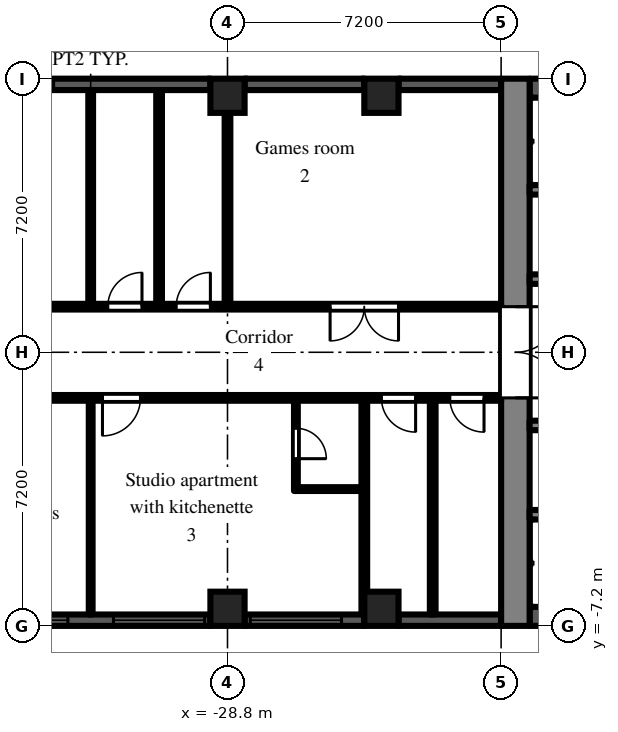
"""IFC4 building model, lengths in metres.
Left out: names, types, materials, properties, quantities, classifications, styles, units other than length and angle.
Written with IfcOpenShell. Run it as: python <this file> out.ifc"""

import sys

from ifc_helpers import new_model, si_unit, direction, frame, frame_2d, origin, origin_2d, place, context, subcontext, project, spatial, rectangle, extrude, element, fill, save


model = new_model("IFC4")
c1 = context("Model", 3, precision=1e-05, world=origin(), true_north=direction((0.0, 1.0)))
c2 = subcontext(c1, "Body", "Model", "MODEL_VIEW")
j1 = project(units=[si_unit("LENGTHUNIT", "METRE"), si_unit("PLANEANGLEUNIT", "RADIAN")], contexts=[c1])
p1 = place(None, origin())
s1 = spatial("IfcSite", under=j1, at=p1, CompositionType="ELEMENT")
p2 = place(p1, origin())
s2 = spatial("IfcBuilding", under=s1, at=p2, CompositionType="ELEMENT")
p3 = place(p2, frame((0.0, 0.0, 75.9)))
s3 = spatial("IfcBuildingStorey", under=s2, at=p3, CompositionType="ELEMENT", Elevation=75.9)
for number, where, z_axis, x_axis in (
    (1, (-28.8, -6.75, 0.0), (0.0, 0.0, 1.0), (1.0, 0.0, 0.0)),
    (2, (-28.8, 6.75, 0.0), (0.0, 0.0, 1.0), (1.0, 0.0, 0.0)),
    (3, (-24.75, -6.75, 0.0), (0.0, 0.0, 1.0), (1.0, 0.0, 0.0)),
    (4, (-24.75, 6.75, 0.0), (0.0, 0.0, 1.0), (1.0, 0.0, 0.0)),
):
    element("IfcColumn", number, at=place(p3, frame(where, z_axis=z_axis, x_axis=x_axis)), inside=s3, PredefinedType="COLUMN", context=c2, shape_type="SweptSolid", body=[
        extrude(rectangle(XDim=0.9, YDim=0.9, at=origin_2d()), origin(), (0.0, 0.0, 1.0), 3.0),
    ])
p4 = place(p3, frame((-21.6, 7.05, 0.0), z_axis=(0.0, 0.0, 1.0), x_axis=(-1.0, 0.0, 0.0)))
e5 = element("IfcWall", 5, at=p4, inside=s3, PredefinedType="SOLIDWALL", context=c2, shape_type="SweptSolid", body=[
    extrude(rectangle(XDim=2.7, YDim=0.3, at=frame_2d((1.35, 0.0))), origin(), (0.0, 0.0, 1.0), 2.1),
])
p5 = place(p3, frame((-25.2, 7.05, 0.0), z_axis=(0.0, 0.0, 1.0), x_axis=(-1.0, 0.0, 0.0)))
e6 = element("IfcWall", 6, at=p5, inside=s3, PredefinedType="SOLIDWALL", context=c2, shape_type="SweptSolid", body=[
    extrude(rectangle(XDim=3.15, YDim=0.3, at=frame_2d((1.575, 0.0))), origin(), (0.0, 0.0, 1.0), 2.1),
])
p6 = place(p3, frame((-29.25, 7.05, 0.0), z_axis=(0.0, 0.0, 1.0), x_axis=(-1.0, 0.0, 0.0)))
e7 = element("IfcWall", 7, at=p6, inside=s3, PredefinedType="SOLIDWALL", context=c2, shape_type="SweptSolid", body=[
    extrude(rectangle(XDim=6.3, YDim=0.3, at=frame_2d((3.15, 0.0))), origin(), (0.0, 0.0, 1.0), 2.1),
])
p7 = place(p6, frame((4.125, 0.0, 0.2)))
e8 = element("IfcOpeningElement", 8, at=p7, cuts=e7, PredefinedType="OPENING", context=c2, shape_type="SweptSolid", body=[
    extrude(rectangle(XDim=1.2, YDim=1.85, at=frame_2d((0.6, 0.925))), frame((0.0, 0.16, 0.0), z_axis=(0.0, -1.0, 0.0), x_axis=(1.0, 0.0, 0.0)), (0.0, 0.0, 1.0), 0.32),
])
p8 = place(p3, frame((-35.55, -7.05, 0.0), z_axis=(0.0, 0.0, 1.0), x_axis=(1.0, 0.0, 0.0)))
e9 = element("IfcWall", 9, at=p8, inside=s3, PredefinedType="SOLIDWALL", context=c2, shape_type="SweptSolid", body=[
    extrude(rectangle(XDim=6.3, YDim=0.3, at=frame_2d((3.15, 0.0))), origin(), (0.0, 0.0, 1.0), 2.1),
])
p9 = place(p8, frame((0.15, 0.0, 0.2)))
e10 = element("IfcOpeningElement", 10, at=p9, cuts=e9, PredefinedType="OPENING", context=c2, shape_type="SweptSolid", body=[
    extrude(rectangle(XDim=2.4, YDim=1.85, at=frame_2d((1.2, 0.925))), frame((0.0, 0.16, 0.0), z_axis=(0.0, -1.0, 0.0), x_axis=(1.0, 0.0, 0.0)), (0.0, 0.0, 1.0), 0.32),
])
p10 = place(p8, frame((3.75, 0.0, 0.2)))
e11 = element("IfcOpeningElement", 11, at=p10, cuts=e9, PredefinedType="OPENING", context=c2, shape_type="SweptSolid", body=[
    extrude(rectangle(XDim=2.4, YDim=1.85, at=frame_2d((1.2, 0.925))), frame((0.0, 0.16, 0.0), z_axis=(0.0, -1.0, 0.0), x_axis=(1.0, 0.0, 0.0)), (0.0, 0.0, 1.0), 0.32),
])
p11 = place(p3, frame((-28.35, -7.05, 0.0), z_axis=(0.0, 0.0, 1.0), x_axis=(1.0, 0.0, 0.0)))
e12 = element("IfcWall", 12, at=p11, inside=s3, PredefinedType="SOLIDWALL", context=c2, shape_type="SweptSolid", body=[
    extrude(rectangle(XDim=3.15, YDim=0.3, at=frame_2d((1.575, 0.0))), origin(), (0.0, 0.0, 1.0), 2.1),
])
p12 = place(p11, frame((0.15, 0.0, 0.2)))
e13 = element("IfcOpeningElement", 13, at=p12, cuts=e12, PredefinedType="OPENING", context=c2, shape_type="SweptSolid", body=[
    extrude(rectangle(XDim=2.4, YDim=1.85, at=frame_2d((1.2, 0.925))), frame((0.0, 0.16, 0.0), z_axis=(0.0, -1.0, 0.0), x_axis=(1.0, 0.0, 0.0)), (0.0, 0.0, 1.0), 0.32),
])
p13 = place(p3, frame((-24.3, -7.05, 0.0), z_axis=(0.0, 0.0, 1.0), x_axis=(1.0, 0.0, 0.0)))
e14 = element("IfcWall", 14, at=p13, inside=s3, PredefinedType="SOLIDWALL", context=c2, shape_type="SweptSolid", body=[
    extrude(rectangle(XDim=2.7, YDim=0.3, at=frame_2d((1.35, 0.0))), origin(), (0.0, 0.0, 1.0), 2.1),
])
p14 = place(p3, frame((-21.225, -7.2, 0.0), z_axis=(0.0, 0.0, 1.0), x_axis=(0.0, 1.0, 0.0)))
e15 = element("IfcWall", 15, at=p14, inside=s3, PredefinedType="SHEAR", context=c2, shape_type="SweptSolid", body=[
    extrude(rectangle(XDim=14.4, YDim=0.75, at=frame_2d((7.2, 0.0))), origin(), (0.0, 0.0, 1.0), 2.575),
])
p15 = place(p14, frame((6.0, 0.0, 0.0)))
e16 = element("IfcOpeningElement", 16, at=p15, cuts=e15, PredefinedType="OPENING", context=c2, shape_type="SweptSolid", body=[
    extrude(rectangle(XDim=2.4, YDim=2.2, at=frame_2d((1.2, 1.1))), frame((0.0, 0.385, 0.0), z_axis=(0.0, -1.0, 0.0), x_axis=(1.0, 0.0, 0.0)), (0.0, 0.0, 1.0), 0.77),
])
p16 = place(p3, frame((-7.9, 6.95, 0.0), z_axis=(0.0, 0.0, 1.0), x_axis=(-1.0, 0.0, 0.0)))
e17 = element("IfcWall", 17, at=p16, inside=s3, PredefinedType="SHEAR", context=c2, shape_type="SweptSolid", body=[
    extrude(rectangle(XDim=12.95, YDim=0.5, at=frame_2d((6.475, 0.0))), origin(), (0.0, 0.0, 1.0), 2.575),
])
p17 = place(p3, frame((-7.9, 1.925, 0.0), z_axis=(0.0, 0.0, 1.0), x_axis=(-1.0, 0.0, 0.0)))
e18 = element("IfcWall", 18, at=p17, inside=s3, PredefinedType="SHEAR", context=c2, shape_type="SweptSolid", body=[
    extrude(rectangle(XDim=12.95, YDim=0.25, at=frame_2d((6.475, 0.0))), origin(), (0.0, 0.0, 1.0), 2.575),
])
p18 = place(p17, frame((0.525, 0.0, 0.0)))
e19 = element("IfcOpeningElement", 19, at=p18, cuts=e18, PredefinedType="OPENING", context=c2, shape_type="SweptSolid", body=[
    extrude(rectangle(XDim=0.9, YDim=2.1, at=frame_2d((0.45, 1.05))), frame((0.0, 0.135, 0.0), z_axis=(0.0, -1.0, 0.0), x_axis=(1.0, 0.0, 0.0)), (0.0, 0.0, 1.0), 0.27),
])
p19 = place(p17, frame((2.625, 0.0, 0.0)))
e20 = element("IfcOpeningElement", 20, at=p19, cuts=e18, PredefinedType="OPENING", context=c2, shape_type="SweptSolid", body=[
    extrude(rectangle(XDim=1.1, YDim=2.1, at=frame_2d((0.55, 1.05))), frame((0.0, 0.135, 0.0), z_axis=(0.0, -1.0, 0.0), x_axis=(1.0, 0.0, 0.0)), (0.0, 0.0, 1.0), 0.27),
])
p20 = place(p17, frame((4.925, 0.0, 0.0)))
e21 = element("IfcOpeningElement", 21, at=p20, cuts=e18, PredefinedType="OPENING", context=c2, shape_type="SweptSolid", body=[
    extrude(rectangle(XDim=0.9, YDim=2.1, at=frame_2d((0.45, 1.05))), frame((0.0, 0.135, 0.0), z_axis=(0.0, -1.0, 0.0), x_axis=(1.0, 0.0, 0.0)), (0.0, 0.0, 1.0), 0.27),
])
p21 = place(p17, frame((8.225, 0.0, 0.0)))
e22 = element("IfcOpeningElement", 22, at=p21, cuts=e18, PredefinedType="OPENING", context=c2, shape_type="SweptSolid", body=[
    extrude(rectangle(XDim=0.9, YDim=2.1, at=frame_2d((0.45, 1.05))), frame((0.0, 0.135, 0.0), z_axis=(0.0, -1.0, 0.0), x_axis=(1.0, 0.0, 0.0)), (0.0, 0.0, 1.0), 0.27),
])
p22 = place(p3, frame((-12.3, 4.275, 0.0), z_axis=(0.0, 0.0, 1.0), x_axis=(-1.0, 0.0, 0.0)))
e23 = element("IfcWall", 23, at=p22, inside=s3, PredefinedType="SHEAR", context=c2, shape_type="SweptSolid", body=[
    extrude(rectangle(XDim=8.55, YDim=0.25, at=frame_2d((4.275, 0.0))), origin(), (0.0, 0.0, 1.0), 2.575),
])
p23 = place(p3, frame((-7.9, -6.95, 0.0), z_axis=(0.0, 0.0, 1.0), x_axis=(-1.0, 0.0, 0.0)))
e24 = element("IfcWall", 24, at=p23, inside=s3, PredefinedType="SHEAR", context=c2, shape_type="SweptSolid", body=[
    extrude(rectangle(XDim=12.95, YDim=0.5, at=frame_2d((6.475, 0.0))), origin(), (0.0, 0.0, 1.0), 2.575),
])
p24 = place(p3, frame((-7.9, -1.925, 0.0), z_axis=(0.0, 0.0, 1.0), x_axis=(-1.0, 0.0, 0.0)))
e25 = element("IfcWall", 25, at=p24, inside=s3, PredefinedType="SHEAR", context=c2, shape_type="SweptSolid", body=[
    extrude(rectangle(XDim=12.95, YDim=0.25, at=frame_2d((6.475, 0.0))), origin(), (0.0, 0.0, 1.0), 2.575),
])
p25 = place(p24, frame((4.825, 0.0, 0.0)))
e26 = element("IfcOpeningElement", 26, at=p25, cuts=e25, PredefinedType="OPENING", context=c2, shape_type="SweptSolid", body=[
    extrude(rectangle(XDim=1.1, YDim=2.1, at=frame_2d((0.55, 1.05))), frame((0.0, 0.135, 0.0), z_axis=(0.0, -1.0, 0.0), x_axis=(1.0, 0.0, 0.0)), (0.0, 0.0, 1.0), 0.27),
])
p26 = place(p24, frame((7.025, 0.0, 0.0)))
e27 = element("IfcOpeningElement", 27, at=p26, cuts=e25, PredefinedType="OPENING", context=c2, shape_type="SweptSolid", body=[
    extrude(rectangle(XDim=1.1, YDim=2.1, at=frame_2d((0.55, 1.05))), frame((0.0, 0.135, 0.0), z_axis=(0.0, -1.0, 0.0), x_axis=(1.0, 0.0, 0.0)), (0.0, 0.0, 1.0), 0.27),
])
p27 = place(p24, frame((9.225, 0.0, 0.0)))
e28 = element("IfcOpeningElement", 28, at=p27, cuts=e25, PredefinedType="OPENING", context=c2, shape_type="SweptSolid", body=[
    extrude(rectangle(XDim=1.1, YDim=2.1, at=frame_2d((0.55, 1.05))), frame((0.0, 0.135, 0.0), z_axis=(0.0, -1.0, 0.0), x_axis=(1.0, 0.0, 0.0)), (0.0, 0.0, 1.0), 0.27),
])
p28 = place(p24, frame((0.525, 0.0, 0.0)))
e29 = element("IfcOpeningElement", 29, at=p28, cuts=e25, PredefinedType="OPENING", context=c2, shape_type="SweptSolid", body=[
    extrude(rectangle(XDim=0.9, YDim=2.1, at=frame_2d((0.45, 1.05))), frame((0.0, 0.135, 0.0), z_axis=(0.0, -1.0, 0.0), x_axis=(1.0, 0.0, 0.0)), (0.0, 0.0, 1.0), 0.27),
])
p29 = place(p24, frame((2.625, 0.0, 0.0)))
e30 = element("IfcOpeningElement", 30, at=p29, cuts=e25, PredefinedType="OPENING", context=c2, shape_type="SweptSolid", body=[
    extrude(rectangle(XDim=1.1, YDim=2.1, at=frame_2d((0.55, 1.05))), frame((0.0, 0.135, 0.0), z_axis=(0.0, -1.0, 0.0), x_axis=(1.0, 0.0, 0.0)), (0.0, 0.0, 1.0), 0.27),
])
p30 = place(p3, frame((-12.3, -4.275, 0.0), z_axis=(0.0, 0.0, 1.0), x_axis=(-1.0, 0.0, 0.0)))
e31 = element("IfcWall", 31, at=p30, inside=s3, PredefinedType="SHEAR", context=c2, shape_type="SweptSolid", body=[
    extrude(rectangle(XDim=8.55, YDim=0.25, at=frame_2d((4.275, 0.0))), origin(), (0.0, 0.0, 1.0), 2.575),
])
p31 = place(p3, frame((-36.5, -1.2, 0.0), z_axis=(0.0, 0.0, 1.0), x_axis=(1.0, 0.0, 0.0)))
e32 = element("IfcWall", 32, at=p31, inside=s3, PredefinedType="PARTITIONING", context=c2, shape_type="SweptSolid", body=[
    extrude(rectangle(XDim=14.9, YDim=0.15, at=frame_2d((7.45, 0.0))), origin(), (0.0, 0.0, 1.0), 2.575),
])
p32 = place(p31, frame((13.55, 0.0, 0.0)))
e33 = element("IfcOpeningElement", 33, at=p32, cuts=e32, PredefinedType="OPENING", context=c2, shape_type="SweptSolid", body=[
    extrude(rectangle(XDim=0.9, YDim=2.1, at=frame_2d((0.45, 1.05))), frame((0.0, 0.085, 0.0), z_axis=(0.0, -1.0, 0.0), x_axis=(1.0, 0.0, 0.0)), (0.0, 0.0, 1.0), 0.17),
])
p33 = place(p31, frame((11.75, 0.0, 0.0)))
e34 = element("IfcOpeningElement", 34, at=p33, cuts=e32, PredefinedType="OPENING", context=c2, shape_type="SweptSolid", body=[
    extrude(rectangle(XDim=0.9, YDim=2.1, at=frame_2d((0.45, 1.05))), frame((0.0, 0.085, 0.0), z_axis=(0.0, -1.0, 0.0), x_axis=(1.0, 0.0, 0.0)), (0.0, 0.0, 1.0), 0.17),
])
p34 = place(p31, frame((4.41, 0.0, 0.0)))
e35 = element("IfcOpeningElement", 35, at=p34, cuts=e32, PredefinedType="OPENING", context=c2, shape_type="SweptSolid", body=[
    extrude(rectangle(XDim=1.0, YDim=2.1, at=frame_2d((0.5, 1.05))), frame((0.0, 0.085, 0.0), z_axis=(0.0, -1.0, 0.0), x_axis=(1.0, 0.0, 0.0)), (0.0, 0.0, 1.0), 0.17),
])
p35 = place(p31, frame((1.15, 0.0, 0.0)))
e36 = element("IfcOpeningElement", 36, at=p35, cuts=e32, PredefinedType="OPENING", context=c2, shape_type="SweptSolid", body=[
    extrude(rectangle(XDim=1.8, YDim=2.1, at=frame_2d((0.9, 1.05))), frame((0.0, 0.085, 0.0), z_axis=(0.0, -1.0, 0.0), x_axis=(1.0, 0.0, 0.0)), (0.0, 0.0, 1.0), 0.17),
])
p36 = place(p3, frame((-36.5, 1.2, 0.0), z_axis=(0.0, 0.0, 1.0), x_axis=(1.0, 0.0, 0.0)))
e37 = element("IfcWall", 37, at=p36, inside=s3, PredefinedType="PARTITIONING", context=c2, shape_type="SweptSolid", body=[
    extrude(rectangle(XDim=14.9, YDim=0.15, at=frame_2d((7.45, 0.0))), origin(), (0.0, 0.0, 1.0), 2.575),
])
p37 = place(p36, frame((10.4, 0.0, 0.0)))
e38 = element("IfcOpeningElement", 38, at=p37, cuts=e37, PredefinedType="OPENING", context=c2, shape_type="SweptSolid", body=[
    extrude(rectangle(XDim=1.8, YDim=2.1, at=frame_2d((0.9, 1.05))), frame((0.0, 0.085, 0.0), z_axis=(0.0, -1.0, 0.0), x_axis=(1.0, 0.0, 0.0)), (0.0, 0.0, 1.0), 0.17),
])
p38 = place(p36, frame((6.35, 0.0, 0.0)))
e39 = element("IfcOpeningElement", 39, at=p38, cuts=e37, PredefinedType="OPENING", context=c2, shape_type="SweptSolid", body=[
    extrude(rectangle(XDim=0.9, YDim=2.1, at=frame_2d((0.45, 1.05))), frame((0.0, 0.085, 0.0), z_axis=(0.0, -1.0, 0.0), x_axis=(1.0, 0.0, 0.0)), (0.0, 0.0, 1.0), 0.17),
])
p39 = place(p36, frame((4.55, 0.0, 0.0)))
e40 = element("IfcOpeningElement", 40, at=p39, cuts=e37, PredefinedType="OPENING", context=c2, shape_type="SweptSolid", body=[
    extrude(rectangle(XDim=0.9, YDim=2.1, at=frame_2d((0.45, 1.05))), frame((0.0, 0.085, 0.0), z_axis=(0.0, -1.0, 0.0), x_axis=(1.0, 0.0, 0.0)), (0.0, 0.0, 1.0), 0.17),
])
p40 = place(p36, frame((1.15, 0.0, 0.0)))
e41 = element("IfcOpeningElement", 41, at=p40, cuts=e37, PredefinedType="OPENING", context=c2, shape_type="SweptSolid", body=[
    extrude(rectangle(XDim=1.8, YDim=2.1, at=frame_2d((0.9, 1.05))), frame((0.0, 0.085, 0.0), z_axis=(0.0, -1.0, 0.0), x_axis=(1.0, 0.0, 0.0)), (0.0, 0.0, 1.0), 0.17),
])
p41 = place(p3, frame((-32.4, -6.9, 0.0), z_axis=(0.0, 0.0, 1.0), x_axis=(0.0, 1.0, 0.0)))
e42 = element("IfcWall", 42, at=p41, inside=s3, PredefinedType="PARTITIONING", context=c2, shape_type="SweptSolid", body=[
    extrude(rectangle(XDim=5.625, YDim=0.1, at=frame_2d((2.812, 0.0))), origin(), (0.0, 0.0, 1.0), 2.575),
])
p42 = place(p3, frame((-32.4, 1.275, 0.0), z_axis=(0.0, 0.0, 1.0), x_axis=(0.0, 1.0, 0.0)))
e43 = element("IfcWall", 43, at=p42, inside=s3, PredefinedType="PARTITIONING", context=c2, shape_type="SweptSolid", body=[
    extrude(rectangle(XDim=5.625, YDim=0.125, at=frame_2d((2.812, 0.0))), origin(), (0.0, 0.0, 1.0), 2.575),
])
for number, where, z_axis, x_axis in (
    (44, (-30.6, 1.275, 0.0), (0.0, 0.0, 1.0), (0.0, 1.0, 0.0)),
    (45, (-28.8, 1.275, 0.0), (0.0, 0.0, 1.0), (0.0, 1.0, 0.0)),
):
    element("IfcWall", number, at=place(p3, frame(where, z_axis=z_axis, x_axis=x_axis)), inside=s3, PredefinedType="PARTITIONING", context=c2, shape_type="SweptSolid", body=[
        extrude(rectangle(XDim=5.625, YDim=0.15, at=frame_2d((2.812, 0.0))), origin(), (0.0, 0.0, 1.0), 2.575),
    ])
p43 = place(p3, frame((-27.0, -3.65, 0.0), z_axis=(0.0, 0.0, 1.0), x_axis=(0.0, 1.0, 0.0)))
e46 = element("IfcWall", 46, at=p43, inside=s3, PredefinedType="PARTITIONING", context=c2, shape_type="SweptSolid", body=[
    extrude(rectangle(XDim=2.375, YDim=0.1, at=frame_2d((1.188, 0.0))), origin(), (0.0, 0.0, 1.0), 2.575),
])
p44 = place(p43, frame((0.85, 0.0, 0.0)))
e47 = element("IfcOpeningElement", 47, at=p44, cuts=e46, PredefinedType="OPENING", context=c2, shape_type="SweptSolid", body=[
    extrude(rectangle(XDim=0.8, YDim=2.1, at=frame_2d((0.4, 1.05))), frame((0.0, 0.06, 0.0), z_axis=(0.0, -1.0, 0.0), x_axis=(1.0, 0.0, 0.0)), (0.0, 0.0, 1.0), 0.12),
])
p45 = place(p3, frame((-26.95, -3.6, 0.0), z_axis=(0.0, 0.0, 1.0), x_axis=(1.0, 0.0, 0.0)))
e48 = element("IfcWall", 48, at=p45, inside=s3, PredefinedType="PARTITIONING", context=c2, shape_type="SweptSolid", body=[
    extrude(rectangle(XDim=1.675, YDim=0.1, at=frame_2d((0.837, 0.0))), origin(), (0.0, 0.0, 1.0), 2.575),
])
for number, where, z_axis, x_axis in (
    (49, (-25.2, -6.9, 0.0), (0.0, 0.0, 1.0), (0.0, 1.0, 0.0)),
    (50, (-23.4, -6.9, 0.0), (0.0, 0.0, 1.0), (0.0, 1.0, 0.0)),
):
    element("IfcWall", number, at=place(p3, frame(where, z_axis=z_axis, x_axis=x_axis)), inside=s3, PredefinedType="PARTITIONING", context=c2, shape_type="SweptSolid", body=[
        extrude(rectangle(XDim=5.625, YDim=0.15, at=frame_2d((2.812, 0.0))), origin(), (0.0, 0.0, 1.0), 2.575),
    ])
p46 = place(p7, origin())
e51 = element("IfcWindow", 51, at=p46, inside=s3, PartitioningType="SINGLE_PANEL", PredefinedType="WINDOW", context=c2, shape_type="SweptSolid", body=[
    extrude(rectangle(XDim=1.2, YDim=1.85, at=frame_2d((0.6, 0.925))), frame((0.0, 0.03, 0.0), z_axis=(0.0, -1.0, 0.0), x_axis=(1.0, 0.0, 0.0)), (0.0, 0.0, 1.0), 0.06),
])
fill(e8, e51)
p47 = place(p9, origin())
e52 = element("IfcWindow", 52, at=p47, inside=s3, PartitioningType="SINGLE_PANEL", PredefinedType="WINDOW", context=c2, shape_type="SweptSolid", body=[
    extrude(rectangle(XDim=2.4, YDim=1.85, at=frame_2d((1.2, 0.925))), frame((0.0, 0.03, 0.0), z_axis=(0.0, -1.0, 0.0), x_axis=(1.0, 0.0, 0.0)), (0.0, 0.0, 1.0), 0.06),
])
fill(e10, e52)
p48 = place(p10, origin())
e53 = element("IfcWindow", 53, at=p48, inside=s3, PartitioningType="SINGLE_PANEL", PredefinedType="WINDOW", context=c2, shape_type="SweptSolid", body=[
    extrude(rectangle(XDim=2.4, YDim=1.85, at=frame_2d((1.2, 0.925))), frame((0.0, 0.03, 0.0), z_axis=(0.0, -1.0, 0.0), x_axis=(1.0, 0.0, 0.0)), (0.0, 0.0, 1.0), 0.06),
])
fill(e11, e53)
p49 = place(p12, origin())
e54 = element("IfcWindow", 54, at=p49, inside=s3, PartitioningType="SINGLE_PANEL", PredefinedType="WINDOW", context=c2, shape_type="SweptSolid", body=[
    extrude(rectangle(XDim=2.4, YDim=1.85, at=frame_2d((1.2, 0.925))), frame((0.0, 0.03, 0.0), z_axis=(0.0, -1.0, 0.0), x_axis=(1.0, 0.0, 0.0)), (0.0, 0.0, 1.0), 0.06),
])
fill(e13, e54)
p50 = place(p15, frame((2.4, 0.0, 0.0), z_axis=(0.0, 0.0, 1.0), x_axis=(-1.0, 0.0, 0.0)))
e55 = element("IfcDoor", 55, at=p50, inside=s3, OperationType="DOUBLE_DOOR_DOUBLE_SWING", PredefinedType="DOOR", context=c2, shape_type="SweptSolid", body=[
    extrude(rectangle(XDim=2.4, YDim=2.2, at=frame_2d((1.2, 1.1))), frame((0.0, 0.025, 0.0), z_axis=(0.0, -1.0, 0.0), x_axis=(1.0, 0.0, 0.0)), (0.0, 0.0, 1.0), 0.05),
])
fill(e16, e55)
p51 = place(p32, frame((0.9, 0.0, 0.0), z_axis=(0.0, 0.0, 1.0), x_axis=(-1.0, 0.0, 0.0)))
e56 = element("IfcDoor", 56, at=p51, inside=s3, OperationType="SINGLE_SWING_LEFT", PredefinedType="DOOR", context=c2, shape_type="SweptSolid", body=[
    extrude(rectangle(XDim=0.9, YDim=2.1, at=frame_2d((0.45, 1.05))), frame((0.0, 0.025, 0.0), z_axis=(0.0, -1.0, 0.0), x_axis=(1.0, 0.0, 0.0)), (0.0, 0.0, 1.0), 0.05),
])
fill(e33, e56)
p52 = place(p33, frame((0.9, 0.0, 0.0), z_axis=(0.0, 0.0, 1.0), x_axis=(-1.0, 0.0, 0.0)))
e57 = element("IfcDoor", 57, at=p52, inside=s3, OperationType="SINGLE_SWING_LEFT", PredefinedType="DOOR", context=c2, shape_type="SweptSolid", body=[
    extrude(rectangle(XDim=0.9, YDim=2.1, at=frame_2d((0.45, 1.05))), frame((0.0, 0.025, 0.0), z_axis=(0.0, -1.0, 0.0), x_axis=(1.0, 0.0, 0.0)), (0.0, 0.0, 1.0), 0.05),
])
fill(e34, e57)
p53 = place(p44, frame((0.8, 0.0, 0.0), z_axis=(0.0, 0.0, 1.0), x_axis=(-1.0, 0.0, 0.0)))
e58 = element("IfcDoor", 58, at=p53, inside=s3, OperationType="SINGLE_SWING_RIGHT", PredefinedType="DOOR", context=c2, shape_type="SweptSolid", body=[
    extrude(rectangle(XDim=0.8, YDim=2.1, at=frame_2d((0.4, 1.05))), frame((0.0, 0.025, 0.0), z_axis=(0.0, -1.0, 0.0), x_axis=(1.0, 0.0, 0.0)), (0.0, 0.0, 1.0), 0.05),
])
fill(e47, e58)
p54 = place(p34, frame((1.0, 0.0, 0.0), z_axis=(0.0, 0.0, 1.0), x_axis=(-1.0, 0.0, 0.0)))
e59 = element("IfcDoor", 59, at=p54, inside=s3, OperationType="SINGLE_SWING_RIGHT", PredefinedType="DOOR", context=c2, shape_type="SweptSolid", body=[
    extrude(rectangle(XDim=1.0, YDim=2.1, at=frame_2d((0.5, 1.05))), frame((0.0, 0.025, 0.0), z_axis=(0.0, -1.0, 0.0), x_axis=(1.0, 0.0, 0.0)), (0.0, 0.0, 1.0), 0.05),
])
fill(e35, e59)
p55 = place(p37, frame((1.8, 0.0, 0.0), z_axis=(0.0, 0.0, 1.0), x_axis=(-1.0, 0.0, 0.0)))
e60 = element("IfcDoor", 60, at=p55, inside=s3, OperationType="DOUBLE_DOOR_DOUBLE_SWING", PredefinedType="DOOR", context=c2, shape_type="SweptSolid", body=[
    extrude(rectangle(XDim=1.8, YDim=2.1, at=frame_2d((0.9, 1.05))), frame((0.0, 0.025, 0.0), z_axis=(0.0, -1.0, 0.0), x_axis=(1.0, 0.0, 0.0)), (0.0, 0.0, 1.0), 0.05),
])
fill(e38, e60)
p56 = place(p38, origin())
e61 = element("IfcDoor", 61, at=p56, inside=s3, OperationType="SINGLE_SWING_RIGHT", PredefinedType="DOOR", context=c2, shape_type="SweptSolid", body=[
    extrude(rectangle(XDim=0.9, YDim=2.1, at=frame_2d((0.45, 1.05))), frame((0.0, 0.025, 0.0), z_axis=(0.0, -1.0, 0.0), x_axis=(1.0, 0.0, 0.0)), (0.0, 0.0, 1.0), 0.05),
])
fill(e39, e61)
p57 = place(p39, origin())
e62 = element("IfcDoor", 62, at=p57, inside=s3, OperationType="SINGLE_SWING_RIGHT", PredefinedType="DOOR", context=c2, shape_type="SweptSolid", body=[
    extrude(rectangle(XDim=0.9, YDim=2.1, at=frame_2d((0.45, 1.05))), frame((0.0, 0.025, 0.0), z_axis=(0.0, -1.0, 0.0), x_axis=(1.0, 0.0, 0.0)), (0.0, 0.0, 1.0), 0.05),
])
fill(e40, e62)
save(model, sys.argv[1])
